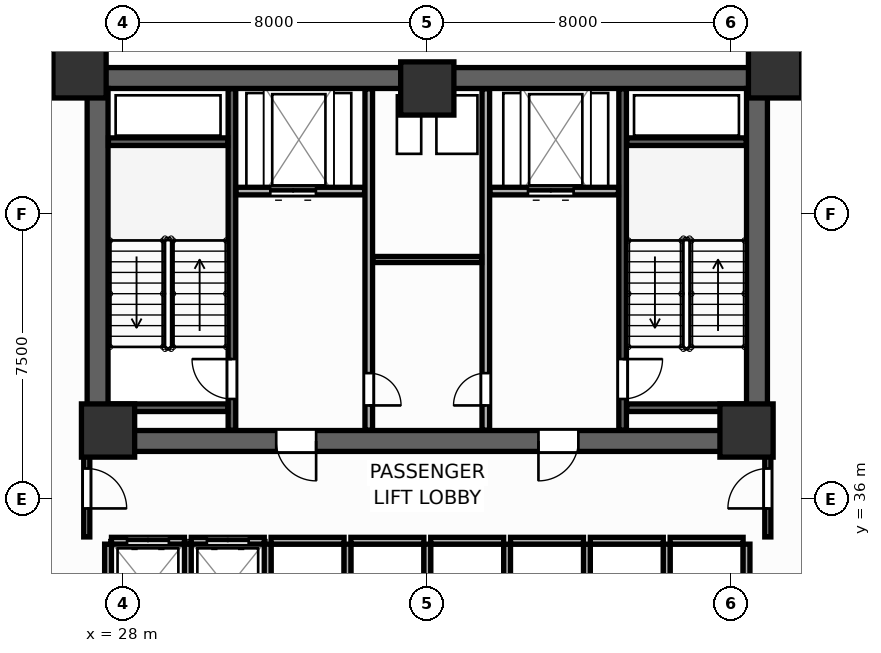
"""IFC4 building model, lengths in metres.
Left out: names, types, materials, properties, quantities, classifications, styles, units other than length and angle.
Written with IfcOpenShell. Run it as: python <this file> out.ifc"""

import sys

from ifc_helpers import new_model, si_unit, direction, frame, frame_2d, origin, origin_2d, place, context, subcontext, project, spatial, rectangle, extrude, source, transform, mapped, element, fill, save


model = new_model("IFC4")
c1 = context("Model", 3, precision=1e-05, world=origin(), true_north=direction((0.0, 1.0)))
c2 = subcontext(c1, "Body", "Model", "MODEL_VIEW")
j1 = project(units=[si_unit("LENGTHUNIT", "METRE"), si_unit("PLANEANGLEUNIT", "RADIAN")], contexts=[c1])
p1 = place(None, origin())
s1 = spatial("IfcSite", under=j1, at=p1, CompositionType="ELEMENT")
p2 = place(p1, origin())
s2 = spatial("IfcBuilding", under=s1, at=p2, CompositionType="ELEMENT")
p3 = place(p2, frame((0.0, 0.0, 67.8)))
s3 = spatial("IfcBuildingStorey", under=s2, at=p3, CompositionType="ELEMENT", Elevation=67.8)
p4 = place(p3, frame((27.05, 47.075, 0.0), z_axis=(0.0, 0.0, 1.0), x_axis=(1.0, 0.0, 0.0)))
e1 = element("IfcWall", 1, at=p4, inside=s3, PredefinedType="SHEAR", context=c2, shape_type="SweptSolid", body=[
    extrude(rectangle(XDim=17.9, YDim=0.55, at=frame_2d((8.95, 0.0))), origin(), (0.0, 0.0, 1.0), 3.9),
])
p5 = place(p3, frame((27.05, 37.525, 0.0), z_axis=(0.0, 0.0, 1.0), x_axis=(1.0, 0.0, 0.0)))
e2 = element("IfcWall", 2, at=p5, inside=s3, PredefinedType="SHEAR", context=c2, shape_type="SweptSolid", body=[
    extrude(rectangle(XDim=17.9, YDim=0.55, at=frame_2d((8.95, 0.0))), origin(), (0.0, 0.0, 1.0), 3.9),
])
p6 = place(p5, frame((4.975, 0.0, 0.0)))
e3 = element("IfcOpeningElement", 3, at=p6, cuts=e2, PredefinedType="OPENING", context=c2, shape_type="SweptSolid", body=[
    extrude(rectangle(XDim=1.05, YDim=2.1, at=frame_2d((0.525, 1.05))), frame((0.0, 0.285, 0.0), z_axis=(0.0, -1.0, 0.0), x_axis=(1.0, 0.0, 0.0)), (0.0, 0.0, 1.0), 0.57),
])
p7 = place(p5, frame((11.875, 0.0, 0.0)))
e4 = element("IfcOpeningElement", 4, at=p7, cuts=e2, PredefinedType="OPENING", context=c2, shape_type="SweptSolid", body=[
    extrude(rectangle(XDim=1.05, YDim=2.1, at=frame_2d((0.525, 1.05))), frame((0.0, 0.285, 0.0), z_axis=(0.0, -1.0, 0.0), x_axis=(1.0, 0.0, 0.0)), (0.0, 0.0, 1.0), 0.57),
])
for number, where, z_axis, x_axis in (
    (5, (27.325, 37.8, 0.0), (0.0, 0.0, 1.0), (0.0, 1.0, 0.0)),
    (6, (44.675, 37.8, 0.0), (0.0, 0.0, 1.0), (0.0, 1.0, 0.0)),
):
    element("IfcWall", number, at=place(p3, frame(where, z_axis=z_axis, x_axis=x_axis)), inside=s3, PredefinedType="SHEAR", context=c2, shape_type="SweptSolid", body=[
        extrude(rectangle(XDim=9.0, YDim=0.55, at=frame_2d((4.5, 0.0))), origin(), (0.0, 0.0, 1.0), 3.9),
    ])
m1 = source(origin(), c2, "Body", "SweptSolid", [
    extrude(rectangle(XDim=1.4, YDim=1.4, at=origin_2d()), origin(), (0.0, 0.0, 1.0), 3.9),
])
for number, where, z_axis, x_axis in (
    (7, (26.85, 47.25, 0.0), (0.0, 0.0, 1.0), (1.0, 0.0, 0.0)),
    (8, (45.15, 47.25, 0.0), (0.0, 0.0, 1.0), (1.0, 0.0, 0.0)),
    (9, (27.6, 37.8, 0.0), (0.0, 0.0, 1.0), (1.0, 0.0, 0.0)),
    (10, (44.4, 37.8, 0.0), (0.0, 0.0, 1.0), (1.0, 0.0, 0.0)),
    (11, (36.0, 46.8, 0.0), (0.0, 0.0, 1.0), (1.0, 0.0, 0.0)),
):
    element("IfcColumn", number, at=place(p3, frame(where, z_axis=z_axis, x_axis=x_axis)), inside=s3, PredefinedType="COLUMN", context=c2, shape_type="MappedRepresentation", body=[
        mapped(m1, transform((0.0, 0.0, 0.0), scale=1.0)),
    ])
p8 = place(p3, frame((30.86, 37.81, 0.0), z_axis=(0.0, 0.0, 1.0), x_axis=(0.0, 1.0, 0.0)))
e12 = element("IfcWall", 12, at=p8, inside=s3, PredefinedType="SHEAR", context=c2, shape_type="SweptSolid", body=[
    extrude(rectangle(XDim=8.98, YDim=0.2, at=frame_2d((4.49, 0.0))), origin(), (0.0, 0.0, 1.0), 3.9),
])
p9 = place(p8, frame((0.82, 0.0, 0.0)))
e13 = element("IfcOpeningElement", 13, at=p9, cuts=e12, PredefinedType="OPENING", context=c2, shape_type="SweptSolid", body=[
    extrude(rectangle(XDim=1.05, YDim=2.1, at=frame_2d((0.525, 1.05))), frame((0.0, 0.11, 0.0), z_axis=(0.0, -1.0, 0.0), x_axis=(1.0, 0.0, 0.0)), (0.0, 0.0, 1.0), 0.22),
])
for number, where, z_axis, x_axis in (
    (14, (27.61, 45.4, 0.0), (0.0, 0.0, 1.0), (1.0, 0.0, 0.0)),
    (15, (27.61, 38.4, 0.0), (0.0, 0.0, 1.0), (1.0, 0.0, 0.0)),
):
    element("IfcWall", number, at=place(p3, frame(where, z_axis=z_axis, x_axis=x_axis)), inside=s3, PredefinedType="SHEAR", context=c2, shape_type="SweptSolid", body=[
        extrude(rectangle(XDim=3.14, YDim=0.2, at=frame_2d((1.57, 0.0))), origin(), (0.0, 0.0, 1.0), 3.9),
    ])
p10 = place(p3, frame((41.14, 37.81, 0.0), z_axis=(0.0, 0.0, 1.0), x_axis=(0.0, 1.0, 0.0)))
e16 = element("IfcWall", 16, at=p10, inside=s3, PredefinedType="SHEAR", context=c2, shape_type="SweptSolid", body=[
    extrude(rectangle(XDim=8.98, YDim=0.2, at=frame_2d((4.49, 0.0))), origin(), (0.0, 0.0, 1.0), 3.9),
])
p11 = place(p10, frame((0.82, 0.0, 0.0)))
e17 = element("IfcOpeningElement", 17, at=p11, cuts=e16, PredefinedType="OPENING", context=c2, shape_type="SweptSolid", body=[
    extrude(rectangle(XDim=1.05, YDim=2.1, at=frame_2d((0.525, 1.05))), frame((0.0, 0.11, 0.0), z_axis=(0.0, -1.0, 0.0), x_axis=(1.0, 0.0, 0.0)), (0.0, 0.0, 1.0), 0.22),
])
for number, where, z_axis, x_axis in (
    (18, (41.25, 45.4, 0.0), (0.0, 0.0, 1.0), (1.0, 0.0, 0.0)),
    (19, (41.25, 38.4, 0.0), (0.0, 0.0, 1.0), (1.0, 0.0, 0.0)),
):
    element("IfcWall", number, at=place(p3, frame(where, z_axis=z_axis, x_axis=x_axis)), inside=s3, PredefinedType="SHEAR", context=c2, shape_type="SweptSolid", body=[
        extrude(rectangle(XDim=3.14, YDim=0.2, at=frame_2d((1.57, 0.0))), origin(), (0.0, 0.0, 1.0), 3.9),
    ])
p12 = place(p3, frame((30.97, 44.1, 0.0), z_axis=(0.0, 0.0, 1.0), x_axis=(1.0, 0.0, 0.0)))
e20 = element("IfcWall", 20, at=p12, inside=s3, PredefinedType="PARTITIONING", context=c2, shape_type="SweptSolid", body=[
    extrude(rectangle(XDim=3.38, YDim=0.2, at=frame_2d((1.69, 0.0))), origin(), (0.0, 0.0, 1.0), 3.68),
])
p13 = place(p12, frame((0.9, 0.0, 0.0)))
e21 = element("IfcOpeningElement", 21, at=p13, cuts=e20, PredefinedType="OPENING", context=c2, shape_type="SweptSolid", body=[
    extrude(rectangle(XDim=1.2, YDim=2.1, at=frame_2d((0.6, 1.05))), frame((0.0, 0.11, 0.0), z_axis=(0.0, -1.0, 0.0), x_axis=(1.0, 0.0, 0.0)), (0.0, 0.0, 1.0), 0.22),
])
p14 = place(p3, frame((37.65, 44.1, 0.0), z_axis=(0.0, 0.0, 1.0), x_axis=(1.0, 0.0, 0.0)))
e22 = element("IfcWall", 22, at=p14, inside=s3, PredefinedType="PARTITIONING", context=c2, shape_type="SweptSolid", body=[
    extrude(rectangle(XDim=3.38, YDim=0.2, at=frame_2d((1.69, 0.0))), origin(), (0.0, 0.0, 1.0), 3.68),
])
p15 = place(p14, frame((1.0, 0.0, 0.0)))
e23 = element("IfcOpeningElement", 23, at=p15, cuts=e22, PredefinedType="OPENING", context=c2, shape_type="SweptSolid", body=[
    extrude(rectangle(XDim=1.2, YDim=2.1, at=frame_2d((0.6, 1.05))), frame((0.0, 0.11, 0.0), z_axis=(0.0, -1.0, 0.0), x_axis=(1.0, 0.0, 0.0)), (0.0, 0.0, 1.0), 0.22),
])
p16 = place(p3, frame((34.46, 37.81, 0.0), z_axis=(0.0, 0.0, 1.0), x_axis=(0.0, 1.0, 0.0)))
e24 = element("IfcWall", 24, at=p16, inside=s3, PredefinedType="PARTITIONING", context=c2, shape_type="SweptSolid", body=[
    extrude(rectangle(XDim=8.98, YDim=0.2, at=frame_2d((4.49, 0.0))), origin(), (0.0, 0.0, 1.0), 3.68),
])
p17 = place(p16, frame((0.65, 0.0, 0.0)))
e25 = element("IfcOpeningElement", 25, at=p17, cuts=e24, PredefinedType="OPENING", context=c2, shape_type="SweptSolid", body=[
    extrude(rectangle(XDim=0.85, YDim=2.05, at=frame_2d((0.425, 1.025))), frame((0.0, 0.11, 0.0), z_axis=(0.0, -1.0, 0.0), x_axis=(1.0, 0.0, 0.0)), (0.0, 0.0, 1.0), 0.22),
])
p18 = place(p3, frame((37.54, 37.81, 0.0), z_axis=(0.0, 0.0, 1.0), x_axis=(0.0, 1.0, 0.0)))
e26 = element("IfcWall", 26, at=p18, inside=s3, PredefinedType="PARTITIONING", context=c2, shape_type="SweptSolid", body=[
    extrude(rectangle(XDim=8.98, YDim=0.2, at=frame_2d((4.49, 0.0))), origin(), (0.0, 0.0, 1.0), 3.68),
])
p19 = place(p18, frame((0.65, 0.0, 0.0)))
e27 = element("IfcOpeningElement", 27, at=p19, cuts=e26, PredefinedType="OPENING", context=c2, shape_type="SweptSolid", body=[
    extrude(rectangle(XDim=0.85, YDim=2.05, at=frame_2d((0.425, 1.025))), frame((0.0, 0.11, 0.0), z_axis=(0.0, -1.0, 0.0), x_axis=(1.0, 0.0, 0.0)), (0.0, 0.0, 1.0), 0.22),
])
p20 = place(p3, frame((34.57, 42.3, 0.0), z_axis=(0.0, 0.0, 1.0), x_axis=(1.0, 0.0, 0.0)))
e28 = element("IfcWall", 28, at=p20, inside=s3, PredefinedType="PARTITIONING", context=c2, shape_type="SweptSolid", body=[
    extrude(rectangle(XDim=2.86, YDim=0.16, at=frame_2d((1.43, 0.0))), origin(), (0.0, 0.0, 1.0), 3.68),
])
p21 = place(p3, frame((27.69, 34.9, 0.0), z_axis=(0.0, 0.0, 1.0), x_axis=(1.0, 0.0, 0.0)))
e29 = element("IfcWall", 29, at=p21, inside=s3, PredefinedType="PARTITIONING", context=c2, shape_type="SweptSolid", body=[
    extrude(rectangle(XDim=1.92, YDim=0.18, at=frame_2d((0.96, 0.0))), origin(), (0.0, 0.0, 1.0), 3.68),
])
p22 = place(p21, frame((0.41, 0.0, 0.0)))
e30 = element("IfcOpeningElement", 30, at=p22, cuts=e29, PredefinedType="OPENING", context=c2, shape_type="SweptSolid", body=[
    extrude(rectangle(XDim=1.1, YDim=2.1, at=frame_2d((0.55, 1.05))), frame((0.0, 0.1, 0.0), z_axis=(0.0, -1.0, 0.0), x_axis=(1.0, 0.0, 0.0)), (0.0, 0.0, 1.0), 0.2),
])
p23 = place(p3, frame((27.6, 32.49, 0.0), z_axis=(0.0, 0.0, 1.0), x_axis=(0.0, 1.0, 0.0)))
e31 = element("IfcWall", 31, at=p23, inside=s3, PredefinedType="PARTITIONING", context=c2, shape_type="SweptSolid", body=[
    extrude(rectangle(XDim=2.32, YDim=0.18, at=frame_2d((1.16, 0.0))), origin(), (0.0, 0.0, 1.0), 3.68),
])
p24 = place(p3, frame((29.79, 34.9, 0.0), z_axis=(0.0, 0.0, 1.0), x_axis=(1.0, 0.0, 0.0)))
e32 = element("IfcWall", 32, at=p24, inside=s3, PredefinedType="PARTITIONING", context=c2, shape_type="SweptSolid", body=[
    extrude(rectangle(XDim=1.92, YDim=0.18, at=frame_2d((0.96, 0.0))), origin(), (0.0, 0.0, 1.0), 3.68),
])
p25 = place(p24, frame((0.41, 0.0, 0.0)))
e33 = element("IfcOpeningElement", 33, at=p25, cuts=e32, PredefinedType="OPENING", context=c2, shape_type="SweptSolid", body=[
    extrude(rectangle(XDim=1.1, YDim=2.1, at=frame_2d((0.55, 1.05))), frame((0.0, 0.1, 0.0), z_axis=(0.0, -1.0, 0.0), x_axis=(1.0, 0.0, 0.0)), (0.0, 0.0, 1.0), 0.2),
])
p26 = place(p3, frame((29.7, 32.49, 0.0), z_axis=(0.0, 0.0, 1.0), x_axis=(0.0, 1.0, 0.0)))
e34 = element("IfcWall", 34, at=p26, inside=s3, PredefinedType="PARTITIONING", context=c2, shape_type="SweptSolid", body=[
    extrude(rectangle(XDim=2.32, YDim=0.18, at=frame_2d((1.16, 0.0))), origin(), (0.0, 0.0, 1.0), 3.68),
])
p27 = place(p3, frame((31.89, 34.9, 0.0), z_axis=(0.0, 0.0, 1.0), x_axis=(1.0, 0.0, 0.0)))
e35 = element("IfcWall", 35, at=p27, inside=s3, PredefinedType="PARTITIONING", context=c2, shape_type="SweptSolid", body=[
    extrude(rectangle(XDim=1.92, YDim=0.18, at=frame_2d((0.96, 0.0))), origin(), (0.0, 0.0, 1.0), 3.68),
])
p28 = place(p3, frame((31.8, 32.49, 0.0), z_axis=(0.0, 0.0, 1.0), x_axis=(0.0, 1.0, 0.0)))
e36 = element("IfcWall", 36, at=p28, inside=s3, PredefinedType="PARTITIONING", context=c2, shape_type="SweptSolid", body=[
    extrude(rectangle(XDim=2.32, YDim=0.18, at=frame_2d((1.16, 0.0))), origin(), (0.0, 0.0, 1.0), 3.68),
])
p29 = place(p3, frame((33.99, 34.9, 0.0), z_axis=(0.0, 0.0, 1.0), x_axis=(1.0, 0.0, 0.0)))
e37 = element("IfcWall", 37, at=p29, inside=s3, PredefinedType="PARTITIONING", context=c2, shape_type="SweptSolid", body=[
    extrude(rectangle(XDim=1.92, YDim=0.18, at=frame_2d((0.96, 0.0))), origin(), (0.0, 0.0, 1.0), 3.68),
])
p30 = place(p3, frame((33.9, 32.49, 0.0), z_axis=(0.0, 0.0, 1.0), x_axis=(0.0, 1.0, 0.0)))
e38 = element("IfcWall", 38, at=p30, inside=s3, PredefinedType="PARTITIONING", context=c2, shape_type="SweptSolid", body=[
    extrude(rectangle(XDim=2.32, YDim=0.18, at=frame_2d((1.16, 0.0))), origin(), (0.0, 0.0, 1.0), 3.68),
])
p31 = place(p3, frame((36.09, 34.9, 0.0), z_axis=(0.0, 0.0, 1.0), x_axis=(1.0, 0.0, 0.0)))
e39 = element("IfcWall", 39, at=p31, inside=s3, PredefinedType="PARTITIONING", context=c2, shape_type="SweptSolid", body=[
    extrude(rectangle(XDim=1.92, YDim=0.18, at=frame_2d((0.96, 0.0))), origin(), (0.0, 0.0, 1.0), 3.68),
])
p32 = place(p3, frame((36.0, 32.49, 0.0), z_axis=(0.0, 0.0, 1.0), x_axis=(0.0, 1.0, 0.0)))
e40 = element("IfcWall", 40, at=p32, inside=s3, PredefinedType="PARTITIONING", context=c2, shape_type="SweptSolid", body=[
    extrude(rectangle(XDim=2.32, YDim=0.18, at=frame_2d((1.16, 0.0))), origin(), (0.0, 0.0, 1.0), 3.68),
])
p33 = place(p3, frame((38.19, 34.9, 0.0), z_axis=(0.0, 0.0, 1.0), x_axis=(1.0, 0.0, 0.0)))
e41 = element("IfcWall", 41, at=p33, inside=s3, PredefinedType="PARTITIONING", context=c2, shape_type="SweptSolid", body=[
    extrude(rectangle(XDim=1.92, YDim=0.18, at=frame_2d((0.96, 0.0))), origin(), (0.0, 0.0, 1.0), 3.68),
])
p34 = place(p3, frame((38.1, 32.49, 0.0), z_axis=(0.0, 0.0, 1.0), x_axis=(0.0, 1.0, 0.0)))
e42 = element("IfcWall", 42, at=p34, inside=s3, PredefinedType="PARTITIONING", context=c2, shape_type="SweptSolid", body=[
    extrude(rectangle(XDim=2.32, YDim=0.18, at=frame_2d((1.16, 0.0))), origin(), (0.0, 0.0, 1.0), 3.68),
])
p35 = place(p3, frame((40.29, 34.9, 0.0), z_axis=(0.0, 0.0, 1.0), x_axis=(1.0, 0.0, 0.0)))
e43 = element("IfcWall", 43, at=p35, inside=s3, PredefinedType="PARTITIONING", context=c2, shape_type="SweptSolid", body=[
    extrude(rectangle(XDim=1.92, YDim=0.18, at=frame_2d((0.96, 0.0))), origin(), (0.0, 0.0, 1.0), 3.68),
])
p36 = place(p3, frame((40.2, 32.49, 0.0), z_axis=(0.0, 0.0, 1.0), x_axis=(0.0, 1.0, 0.0)))
e44 = element("IfcWall", 44, at=p36, inside=s3, PredefinedType="PARTITIONING", context=c2, shape_type="SweptSolid", body=[
    extrude(rectangle(XDim=2.32, YDim=0.18, at=frame_2d((1.16, 0.0))), origin(), (0.0, 0.0, 1.0), 3.68),
])
p37 = place(p3, frame((42.39, 34.9, 0.0), z_axis=(0.0, 0.0, 1.0), x_axis=(1.0, 0.0, 0.0)))
e45 = element("IfcWall", 45, at=p37, inside=s3, PredefinedType="PARTITIONING", context=c2, shape_type="SweptSolid", body=[
    extrude(rectangle(XDim=1.92, YDim=0.18, at=frame_2d((0.96, 0.0))), origin(), (0.0, 0.0, 1.0), 3.68),
])
for number, where, z_axis, x_axis in (
    (46, (42.3, 32.49, 0.0), (0.0, 0.0, 1.0), (0.0, 1.0, 0.0)),
    (47, (44.4, 32.49, 0.0), (0.0, 0.0, 1.0), (0.0, 1.0, 0.0)),
):
    element("IfcWall", number, at=place(p3, frame(where, z_axis=z_axis, x_axis=x_axis)), inside=s3, PredefinedType="PARTITIONING", context=c2, shape_type="SweptSolid", body=[
        extrude(rectangle(XDim=2.32, YDim=0.18, at=frame_2d((1.16, 0.0))), origin(), (0.0, 0.0, 1.0), 3.68),
    ])
p38 = place(p3, frame((27.04, 35.0, 0.0), z_axis=(0.0, 0.0, 1.0), x_axis=(0.0, 1.0, 0.0)))
e48 = element("IfcWall", 48, at=p38, inside=s3, PredefinedType="PARTITIONING", context=c2, shape_type="SweptSolid", body=[
    extrude(rectangle(XDim=2.65, YDim=0.16, at=frame_2d((1.325, 0.0))), origin(), (0.0, 0.0, 1.0), 3.68),
])
p39 = place(p38, frame((0.75, 0.0, 0.0)))
e49 = element("IfcOpeningElement", 49, at=p39, cuts=e48, PredefinedType="OPENING", context=c2, shape_type="SweptSolid", body=[
    extrude(rectangle(XDim=1.05, YDim=2.1, at=frame_2d((0.525, 1.05))), frame((0.0, 0.09, 0.0), z_axis=(0.0, -1.0, 0.0), x_axis=(1.0, 0.0, 0.0)), (0.0, 0.0, 1.0), 0.18),
])
p40 = place(p3, frame((44.96, 35.0, 0.0), z_axis=(0.0, 0.0, 1.0), x_axis=(0.0, 1.0, 0.0)))
e50 = element("IfcWall", 50, at=p40, inside=s3, PredefinedType="PARTITIONING", context=c2, shape_type="SweptSolid", body=[
    extrude(rectangle(XDim=2.65, YDim=0.16, at=frame_2d((1.325, 0.0))), origin(), (0.0, 0.0, 1.0), 3.68),
])
p41 = place(p40, frame((0.75, 0.0, 0.0)))
e51 = element("IfcOpeningElement", 51, at=p41, cuts=e50, PredefinedType="OPENING", context=c2, shape_type="SweptSolid", body=[
    extrude(rectangle(XDim=1.05, YDim=2.1, at=frame_2d((0.525, 1.05))), frame((0.0, 0.09, 0.0), z_axis=(0.0, -1.0, 0.0), x_axis=(1.0, 0.0, 0.0)), (0.0, 0.0, 1.0), 0.18),
])
p42 = place(p3, frame((44.965, 47.34, 0.0), z_axis=(0.0, 0.0, 1.0), x_axis=(0.0, 1.0, 0.0)))
e52 = element("IfcWall", 52, at=p42, inside=s3, PredefinedType="PARTITIONING", context=c2, shape_type="SweptSolid", body=[
    extrude(rectangle(XDim=9.017, YDim=0.16, at=frame_2d((4.508, 0.0))), origin(), (0.0, 0.0, 1.0), 3.68),
])
p43 = place(p42, frame((3.927, 0.0, 0.0)))
e53 = element("IfcOpeningElement", 53, at=p43, cuts=e52, PredefinedType="OPENING", context=c2, shape_type="SweptSolid", body=[
    extrude(rectangle(XDim=0.95, YDim=2.05, at=frame_2d((0.475, 1.025))), frame((0.0, 0.09, 0.0), z_axis=(0.0, -1.0, 0.0), x_axis=(1.0, 0.0, 0.0)), (0.0, 0.0, 1.0), 0.18),
])
p44 = place(p3, frame((27.035, 47.34, 0.0), z_axis=(0.0, 0.0, 1.0), x_axis=(0.0, 1.0, 0.0)))
e54 = element("IfcWall", 54, at=p44, inside=s3, PredefinedType="PARTITIONING", context=c2, shape_type="SweptSolid", body=[
    extrude(rectangle(XDim=8.094, YDim=0.16, at=frame_2d((4.047, 0.0))), origin(), (0.0, 0.0, 1.0), 3.68),
])
p45 = place(p9, origin())
e55 = element("IfcDoor", 55, at=p45, inside=s3, OperationType="SINGLE_SWING_RIGHT", PredefinedType="DOOR", context=c2, shape_type="SweptSolid", body=[
    extrude(rectangle(XDim=1.05, YDim=2.1, at=frame_2d((0.525, 1.05))), frame((0.0, 0.025, 0.0), z_axis=(0.0, -1.0, 0.0), x_axis=(1.0, 0.0, 0.0)), (0.0, 0.0, 1.0), 0.05),
])
fill(e13, e55)
p46 = place(p11, frame((1.05, 0.0, 0.0), z_axis=(0.0, 0.0, 1.0), x_axis=(-1.0, 0.0, 0.0)))
e56 = element("IfcDoor", 56, at=p46, inside=s3, OperationType="SINGLE_SWING_LEFT", PredefinedType="DOOR", context=c2, shape_type="SweptSolid", body=[
    extrude(rectangle(XDim=1.05, YDim=2.1, at=frame_2d((0.525, 1.05))), frame((0.0, 0.025, 0.0), z_axis=(0.0, -1.0, 0.0), x_axis=(1.0, 0.0, 0.0)), (0.0, 0.0, 1.0), 0.05),
])
fill(e17, e56)
p47 = place(p13, origin())
e57 = element("IfcDoor", 57, at=p47, inside=s3, OperationType="DOUBLE_DOOR_SLIDING", PredefinedType="DOOR", context=c2, shape_type="SweptSolid", body=[
    extrude(rectangle(XDim=1.2, YDim=2.1, at=frame_2d((0.6, 1.05))), frame((0.0, 0.025, 0.0), z_axis=(0.0, -1.0, 0.0), x_axis=(1.0, 0.0, 0.0)), (0.0, 0.0, 1.0), 0.05),
])
fill(e21, e57)
p48 = place(p15, origin())
e58 = element("IfcDoor", 58, at=p48, inside=s3, OperationType="DOUBLE_DOOR_SLIDING", PredefinedType="DOOR", context=c2, shape_type="SweptSolid", body=[
    extrude(rectangle(XDim=1.2, YDim=2.1, at=frame_2d((0.6, 1.05))), frame((0.0, 0.025, 0.0), z_axis=(0.0, -1.0, 0.0), x_axis=(1.0, 0.0, 0.0)), (0.0, 0.0, 1.0), 0.05),
])
fill(e23, e58)
p49 = place(p17, frame((0.85, 0.0, 0.0), z_axis=(0.0, 0.0, 1.0), x_axis=(-1.0, 0.0, 0.0)))
e59 = element("IfcDoor", 59, at=p49, inside=s3, OperationType="SINGLE_SWING_RIGHT", PredefinedType="DOOR", context=c2, shape_type="SweptSolid", body=[
    extrude(rectangle(XDim=0.85, YDim=2.05, at=frame_2d((0.425, 1.025))), frame((0.0, 0.025, 0.0), z_axis=(0.0, -1.0, 0.0), x_axis=(1.0, 0.0, 0.0)), (0.0, 0.0, 1.0), 0.05),
])
fill(e25, e59)
p50 = place(p19, origin())
e60 = element("IfcDoor", 60, at=p50, inside=s3, OperationType="SINGLE_SWING_LEFT", PredefinedType="DOOR", context=c2, shape_type="SweptSolid", body=[
    extrude(rectangle(XDim=0.85, YDim=2.05, at=frame_2d((0.425, 1.025))), frame((0.0, 0.025, 0.0), z_axis=(0.0, -1.0, 0.0), x_axis=(1.0, 0.0, 0.0)), (0.0, 0.0, 1.0), 0.05),
])
fill(e27, e60)
p51 = place(p22, origin())
e61 = element("IfcDoor", 61, at=p51, inside=s3, OperationType="DOUBLE_DOOR_SLIDING", PredefinedType="DOOR", context=c2, shape_type="SweptSolid", body=[
    extrude(rectangle(XDim=1.1, YDim=2.1, at=frame_2d((0.55, 1.05))), frame((0.0, 0.025, 0.0), z_axis=(0.0, -1.0, 0.0), x_axis=(1.0, 0.0, 0.0)), (0.0, 0.0, 1.0), 0.05),
])
fill(e30, e61)
p52 = place(p25, origin())
e62 = element("IfcDoor", 62, at=p52, inside=s3, OperationType="DOUBLE_DOOR_SLIDING", PredefinedType="DOOR", context=c2, shape_type="SweptSolid", body=[
    extrude(rectangle(XDim=1.1, YDim=2.1, at=frame_2d((0.55, 1.05))), frame((0.0, 0.025, 0.0), z_axis=(0.0, -1.0, 0.0), x_axis=(1.0, 0.0, 0.0)), (0.0, 0.0, 1.0), 0.05),
])
fill(e33, e62)
p53 = place(p39, frame((1.05, 0.0, 0.0), z_axis=(0.0, 0.0, 1.0), x_axis=(-1.0, 0.0, 0.0)))
e63 = element("IfcDoor", 63, at=p53, inside=s3, OperationType="SINGLE_SWING_RIGHT", PredefinedType="DOOR", context=c2, shape_type="SweptSolid", body=[
    extrude(rectangle(XDim=1.05, YDim=2.1, at=frame_2d((0.525, 1.05))), frame((0.0, 0.025, 0.0), z_axis=(0.0, -1.0, 0.0), x_axis=(1.0, 0.0, 0.0)), (0.0, 0.0, 1.0), 0.05),
])
fill(e49, e63)
p54 = place(p41, origin())
e64 = element("IfcDoor", 64, at=p54, inside=s3, OperationType="SINGLE_SWING_LEFT", PredefinedType="DOOR", context=c2, shape_type="SweptSolid", body=[
    extrude(rectangle(XDim=1.05, YDim=2.1, at=frame_2d((0.525, 1.05))), frame((0.0, 0.025, 0.0), z_axis=(0.0, -1.0, 0.0), x_axis=(1.0, 0.0, 0.0)), (0.0, 0.0, 1.0), 0.05),
])
fill(e51, e64)
p55 = place(p6, frame((1.05, 0.0, 0.0), z_axis=(0.0, 0.0, 1.0), x_axis=(-1.0, 0.0, 0.0)))
e65 = element("IfcDoor", 65, at=p55, inside=s3, OperationType="SINGLE_SWING_LEFT", PredefinedType="DOOR", context=c2, shape_type="SweptSolid", body=[
    extrude(rectangle(XDim=1.05, YDim=2.1, at=frame_2d((0.525, 1.05))), frame((0.0, 0.025, 0.0), z_axis=(0.0, -1.0, 0.0), x_axis=(1.0, 0.0, 0.0)), (0.0, 0.0, 1.0), 0.05),
])
fill(e3, e65)
p56 = place(p7, frame((1.05, 0.0, 0.0), z_axis=(0.0, 0.0, 1.0), x_axis=(-1.0, 0.0, 0.0)))
e66 = element("IfcDoor", 66, at=p56, inside=s3, OperationType="SINGLE_SWING_RIGHT", PredefinedType="DOOR", context=c2, shape_type="SweptSolid", body=[
    extrude(rectangle(XDim=1.05, YDim=2.1, at=frame_2d((0.525, 1.05))), frame((0.0, 0.025, 0.0), z_axis=(0.0, -1.0, 0.0), x_axis=(1.0, 0.0, 0.0)), (0.0, 0.0, 1.0), 0.05),
])
fill(e4, e66)
save(model, sys.argv[1])
